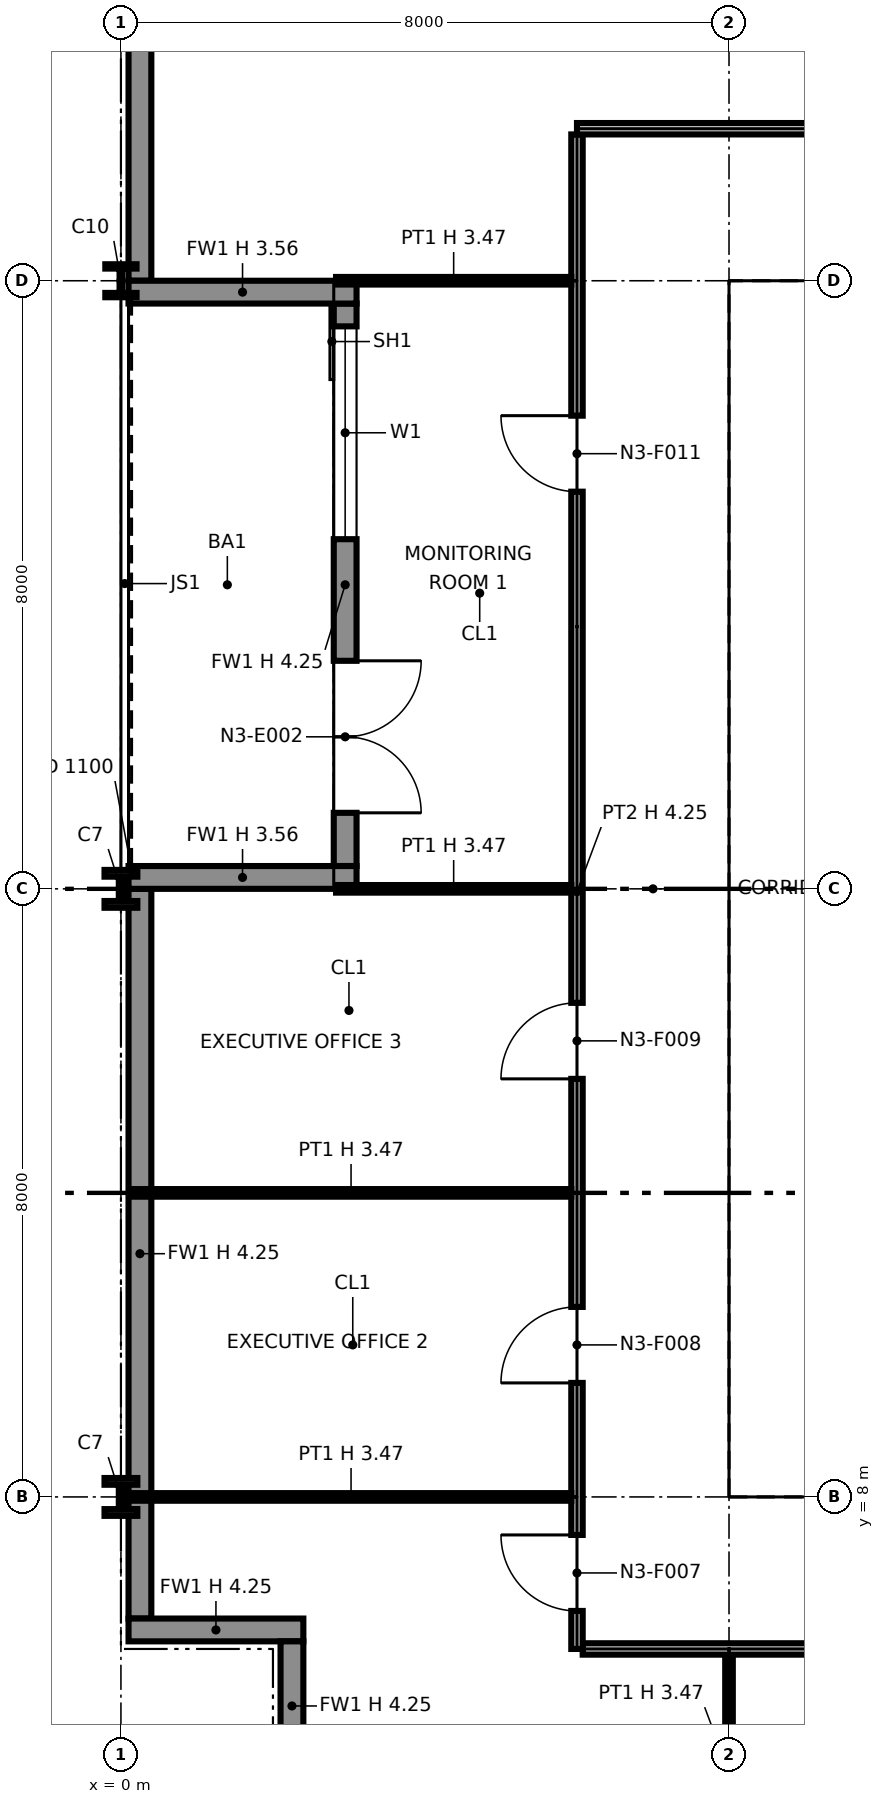
"""IFC4 building model, lengths in metres.
Left out: names, types, materials, properties, quantities, classifications, styles, units other than length and angle.
Written with IfcOpenShell. Run it as: python <this file> out.ifc"""

import sys

from ifc_helpers import new_model, si_unit, direction, frame, frame_2d, origin, origin_2d, place, context, subcontext, project, spatial, polyline, rectangle, i_section, outline, extrude, element, fill, save


model = new_model("IFC4")
c1 = context("Model", 3, precision=1e-05, world=origin(), true_north=direction((0.0, 1.0)))
c2 = subcontext(c1, "Body", "Model", "MODEL_VIEW")
j1 = project(units=[si_unit("LENGTHUNIT", "METRE"), si_unit("PLANEANGLEUNIT", "RADIAN")], contexts=[c1])
p1 = place(None, origin())
s1 = spatial("IfcSite", under=j1, at=p1, CompositionType="ELEMENT")
p2 = place(p1, origin())
s2 = spatial("IfcBuilding", under=s1, at=p2, CompositionType="ELEMENT")
p3 = place(p2, frame((0.0, 0.0, 65.6)))
s3 = spatial("IfcBuildingStorey", under=s2, at=p3, CompositionType="ELEMENT", Elevation=65.6)
for number, where, z_axis, x_axis in (
    (1, (0.0, 8.0, 0.0), (0.0, 0.0, 1.0), (1.0, 0.0, 0.0)),
    (2, (0.0, 16.0, 0.0), (0.0, 0.0, 1.0), (1.0, 0.0, 0.0)),
):
    element("IfcColumn", number, at=place(p3, frame(where, z_axis=z_axis, x_axis=x_axis)), inside=s3, PredefinedType="COLUMN", context=c2, shape_type="SweptSolid", body=[
        extrude(i_section(OverallWidth=0.432, OverallDepth=0.498, WebThickness=0.056, FlangeThickness=0.089, at=origin_2d()), origin(), (0.0, 0.0, 1.0), 4.25),
    ])
p4 = place(p3, frame((0.0, 24.0, 0.0), z_axis=(0.0, 0.0, 1.0), x_axis=(1.0, 0.0, 0.0)))
e3 = element("IfcColumn", 3, at=p4, inside=s3, PredefinedType="COLUMN", context=c2, shape_type="SweptSolid", body=[
    extrude(i_section(OverallWidth=0.411, OverallDepth=0.434, WebThickness=0.036, FlangeThickness=0.057, at=origin_2d()), origin(), (0.0, 0.0, 1.0), 4.25),
])
for number, where, z_axis, x_axis in (
    (4, (8.0, 8.0, 0.0), (0.0, 0.0, 1.0), (1.0, 0.0, 0.0)),
    (5, (8.0, 16.0, 0.0), (0.0, 0.0, 1.0), (1.0, 0.0, 0.0)),
):
    element("IfcColumn", number, at=place(p3, frame(where, z_axis=z_axis, x_axis=x_axis)), inside=s3, PredefinedType="COLUMN", context=c2, shape_type="SweptSolid", body=[
        extrude(i_section(OverallWidth=0.406, OverallDepth=0.417, WebThickness=0.03, FlangeThickness=0.048, at=origin_2d()), origin(), (0.0, 0.0, 1.0), 4.25),
    ])
p5 = place(p3, frame((8.0, 24.0, 0.0), z_axis=(0.0, 0.0, 1.0), x_axis=(1.0, 0.0, 0.0)))
e6 = element("IfcColumn", 6, at=p5, inside=s3, PredefinedType="COLUMN", context=c2, shape_type="SweptSolid", body=[
    extrude(i_section(OverallWidth=0.411, OverallDepth=0.434, WebThickness=0.036, FlangeThickness=0.057, at=origin_2d()), origin(), (0.0, 0.0, 1.0), 4.25),
])
p6 = place(p3, frame((0.25, 32.0, 0.0), z_axis=(0.0, 0.0, 1.0), x_axis=(0.0, -1.0, 0.0)))
e7 = element("IfcWall", 7, at=p6, inside=s3, PredefinedType="SOLIDWALL", context=c2, shape_type="SweptSolid", body=[
    extrude(rectangle(XDim=8.0, YDim=0.3, at=frame_2d((4.0, 0.0))), origin(), (0.0, 0.0, 1.0), 4.25),
])
p7 = place(p3, frame((2.95, 23.7, 0.0), z_axis=(0.0, 0.0, 1.0), x_axis=(0.0, -1.0, 0.0)))
e8 = element("IfcWall", 8, at=p7, inside=s3, PredefinedType="SOLIDWALL", context=c2, shape_type="SweptSolid", body=[
    extrude(rectangle(XDim=7.4, YDim=0.3, at=frame_2d((3.7, 0.0))), origin(), (0.0, 0.0, 1.0), 4.25),
])
p8 = place(p7, frame((0.3, 0.0, 0.9)))
e9 = element("IfcOpeningElement", 9, at=p8, cuts=e8, PredefinedType="OPENING", context=c2, shape_type="SweptSolid", body=[
    extrude(rectangle(XDim=2.8, YDim=2.2, at=frame_2d((1.4, 1.1))), frame((0.0, 0.16, 0.0), z_axis=(0.0, -1.0, 0.0), x_axis=(1.0, 0.0, 0.0)), (0.0, 0.0, 1.0), 0.32),
])
p9 = place(p7, frame((4.7, 0.0, 0.0)))
e10 = element("IfcOpeningElement", 10, at=p9, cuts=e8, PredefinedType="OPENING", context=c2, shape_type="SweptSolid", body=[
    extrude(rectangle(XDim=2.0, YDim=2.4, at=frame_2d((1.0, 1.2))), frame((0.0, 0.16, 0.0), z_axis=(0.0, -1.0, 0.0), x_axis=(1.0, 0.0, 0.0)), (0.0, 0.0, 1.0), 0.32),
])
for number, where, z_axis, x_axis in (
    (11, (0.1, 23.85, 0.0), (0.0, 0.0, 1.0), (1.0, 0.0, 0.0)),
    (12, (0.1, 16.15, 0.0), (0.0, 0.0, 1.0), (1.0, 0.0, 0.0)),
):
    element("IfcWall", number, at=place(p3, frame(where, z_axis=z_axis, x_axis=x_axis)), inside=s3, PredefinedType="SOLIDWALL", context=c2, shape_type="SweptSolid", body=[
        extrude(rectangle(XDim=3.0, YDim=0.3, at=frame_2d((1.5, 0.0))), origin(), (0.0, 0.0, 1.0), 3.556),
    ])
p10 = place(p3, frame((0.25, 16.0, 0.0), z_axis=(0.0, 0.0, 1.0), x_axis=(0.0, -1.0, 0.0)))
e13 = element("IfcWall", 13, at=p10, inside=s3, PredefinedType="SOLIDWALL", context=c2, shape_type="SweptSolid", body=[
    extrude(rectangle(XDim=9.6, YDim=0.3, at=frame_2d((4.8, 0.0))), origin(), (0.0, 0.0, 1.0), 4.25),
])
p11 = place(p3, frame((0.1, 6.25, 0.0), z_axis=(0.0, 0.0, 1.0), x_axis=(1.0, 0.0, 0.0)))
e14 = element("IfcWall", 14, at=p11, inside=s3, PredefinedType="SOLIDWALL", context=c2, shape_type="SweptSolid", body=[
    extrude(rectangle(XDim=2.3, YDim=0.3, at=frame_2d((1.15, 0.0))), origin(), (0.0, 0.0, 1.0), 4.25),
])
p12 = place(p3, frame((2.25, 6.1, 0.0), z_axis=(0.0, 0.0, 1.0), x_axis=(0.0, -1.0, 0.0)))
e15 = element("IfcWall", 15, at=p12, inside=s3, PredefinedType="SOLIDWALL", context=c2, shape_type="SweptSolid", body=[
    extrude(rectangle(XDim=1.7, YDim=0.3, at=frame_2d((0.85, 0.0))), origin(), (0.0, 0.0, 1.0), 4.25),
])
p13 = place(p3, frame((8.65, 8.75, 0.0), z_axis=(0.0, 0.0, 1.0), x_axis=(1.0, 0.0, 0.0)))
e16 = element("IfcWall", 16, at=p13, inside=s3, PredefinedType="PARTITIONING", context=c2, shape_type="SweptSolid", body=[
    extrude(outline(polyline([(0.0, 0.0), (14.7, 0.0), (14.7, 4.25), (7.469, 4.25), (7.469, 3.632), (7.231, 3.632), (7.23, 4.25), (0.0, 4.25), (0.0, 0.0)])), frame((0.0, 0.1, 0.0), z_axis=(0.0, -1.0, 0.0), x_axis=(1.0, 0.0, 0.0)), (0.0, 0.0, 1.0), 0.2),
])
p14 = place(p13, frame((1.3, 0.0, 0.0)))
e17 = element("IfcOpeningElement", 17, at=p14, cuts=e16, PredefinedType="OPENING", context=c2, shape_type="SweptSolid", body=[
    extrude(rectangle(XDim=1.4, YDim=2.1, at=frame_2d((0.7, 1.05))), frame((0.0, 0.11, 0.0), z_axis=(0.0, -1.0, 0.0), x_axis=(1.0, 0.0, 0.0)), (0.0, 0.0, 1.0), 0.22),
])
p15 = place(p13, frame((4.6, 0.0, 0.0)))
e18 = element("IfcOpeningElement", 18, at=p15, cuts=e16, PredefinedType="OPENING", context=c2, shape_type="SweptSolid", body=[
    extrude(rectangle(XDim=1.4, YDim=2.1, at=frame_2d((0.7, 1.05))), frame((0.0, 0.11, 0.0), z_axis=(0.0, -1.0, 0.0), x_axis=(1.0, 0.0, 0.0)), (0.0, 0.0, 1.0), 0.22),
])
p16 = place(p13, frame((10.4, 0.0, 0.0)))
e19 = element("IfcOpeningElement", 19, at=p16, cuts=e16, PredefinedType="OPENING", context=c2, shape_type="SweptSolid", body=[
    extrude(rectangle(XDim=1.2, YDim=2.1, at=frame_2d((0.6, 1.05))), frame((0.0, 0.11, 0.0), z_axis=(0.0, -1.0, 0.0), x_axis=(1.0, 0.0, 0.0)), (0.0, 0.0, 1.0), 0.22),
])
p17 = place(p3, frame((8.75, 8.85, 0.0), z_axis=(0.0, 0.0, 1.0), x_axis=(0.0, 1.0, 0.0)))
e20 = element("IfcWall", 20, at=p17, inside=s3, PredefinedType="PARTITIONING", context=c2, shape_type="SweptSolid", body=[
    extrude(outline(polyline([(0.0, 0.0), (14.3, 0.0), (14.3, 4.25), (10.231, 4.25), (10.23, 3.789), (10.07, 3.789), (10.069, 4.25), (7.27, 4.25), (7.269, 3.632), (7.031, 3.632), (7.031, 4.25), (0.0, 4.25), (0.0, 0.0)])), frame((0.0, 0.1, 0.0), z_axis=(0.0, -1.0, 0.0), x_axis=(1.0, 0.0, 0.0)), (0.0, 0.0, 1.0), 0.2),
])
p18 = place(p17, frame((8.3, 0.0, 0.0)))
e21 = element("IfcOpeningElement", 21, at=p18, cuts=e20, PredefinedType="OPENING", context=c2, shape_type="SweptSolid", body=[
    extrude(rectangle(XDim=1.8, YDim=2.1, at=frame_2d((0.9, 1.05))), frame((0.0, 0.11, 0.0), z_axis=(0.0, -1.0, 0.0), x_axis=(1.0, 0.0, 0.0)), (0.0, 0.0, 1.0), 0.22),
])
p19 = place(p3, frame((8.65, 23.25, 0.0), z_axis=(0.0, 0.0, 1.0), x_axis=(1.0, 0.0, 0.0)))
e22 = element("IfcWall", 22, at=p19, inside=s3, PredefinedType="PARTITIONING", context=c2, shape_type="SweptSolid", body=[
    extrude(outline(polyline([(0.0, 0.0), (14.7, 0.0), (14.7, 4.25), (7.469, 4.25), (7.469, 3.632), (7.231, 3.632), (7.23, 4.25), (0.0, 4.25), (0.0, 0.0)])), frame((0.0, 0.1, 0.0), z_axis=(0.0, -1.0, 0.0), x_axis=(1.0, 0.0, 0.0)), (0.0, 0.0, 1.0), 0.2),
])
p20 = place(p3, frame((8.85, 16.0, 0.0), z_axis=(0.0, 0.0, 1.0), x_axis=(1.0, 0.0, 0.0)))
e23 = element("IfcWall", 23, at=p20, inside=s3, PredefinedType="PARTITIONING", context=c2, shape_type="SweptSolid", body=[
    extrude(rectangle(XDim=6.931, YDim=0.6, at=frame_2d((3.466, 0.0))), origin(), (0.0, 0.0, 1.0), 3.632),
])
p21 = place(p3, frame((8.85, 19.9, 0.0), z_axis=(0.0, 0.0, 1.0), x_axis=(1.0, 0.0, 0.0)))
e24 = element("IfcWall", 24, at=p21, inside=s3, PredefinedType="PARTITIONING", context=c2, shape_type="SweptSolid", body=[
    extrude(outline(polyline([(0.0, 0.0), (14.3, 0.0), (14.3, 3.789), (7.27, 3.789), (7.269, 3.632), (7.031, 3.632), (7.031, 4.25), (0.0, 4.25), (0.0, 0.0)])), frame((0.0, 0.1, 0.0), z_axis=(0.0, -1.0, 0.0), x_axis=(1.0, 0.0, 0.0)), (0.0, 0.0, 1.0), 0.2),
])
p22 = place(p21, frame((6.9, 0.0, 0.0)))
e25 = element("IfcOpeningElement", 25, at=p22, cuts=e24, PredefinedType="OPENING", context=c2, shape_type="SweptSolid", body=[
    extrude(rectangle(XDim=0.9, YDim=2.1, at=frame_2d((0.45, 1.05))), frame((0.0, 0.11, 0.0), z_axis=(0.0, -1.0, 0.0), x_axis=(1.0, 0.0, 0.0)), (0.0, 0.0, 1.0), 0.22),
])
p23 = place(p21, frame((9.95, 0.0, 0.0)))
e26 = element("IfcOpeningElement", 26, at=p23, cuts=e24, PredefinedType="OPENING", context=c2, shape_type="SweptSolid", body=[
    extrude(rectangle(XDim=0.9, YDim=2.1, at=frame_2d((0.45, 1.05))), frame((0.0, 0.11, 0.0), z_axis=(0.0, -1.0, 0.0), x_axis=(1.0, 0.0, 0.0)), (0.0, 0.0, 1.0), 0.22),
])
p24 = place(p21, frame((12.45, 0.0, 0.0)))
e27 = element("IfcOpeningElement", 27, at=p24, cuts=e24, PredefinedType="OPENING", context=c2, shape_type="SweptSolid", body=[
    extrude(rectangle(XDim=0.9, YDim=2.1, at=frame_2d((0.45, 1.05))), frame((0.0, 0.11, 0.0), z_axis=(0.0, -1.0, 0.0), x_axis=(1.0, 0.0, 0.0)), (0.0, 0.0, 1.0), 0.22),
])
p25 = place(p3, frame((8.0, 2.83, 0.0), z_axis=(0.0, 0.0, 1.0), x_axis=(0.0, 1.0, 0.0)))
e28 = element("IfcWall", 28, at=p25, inside=s3, PredefinedType="PARTITIONING", context=c2, shape_type="SweptSolid", body=[
    extrude(rectangle(XDim=3.095, YDim=0.1, at=frame_2d((1.547, 0.0))), origin(), (0.0, 0.0, 1.0), 3.47),
])
p26 = place(p3, frame((6.075, 6.0, 0.0), z_axis=(0.0, 0.0, 1.0), x_axis=(1.0, 0.0, 0.0)))
e29 = element("IfcWall", 29, at=p26, inside=s3, PredefinedType="PARTITIONING", context=c2, shape_type="SweptSolid", body=[
    extrude(rectangle(XDim=19.85, YDim=0.15, at=frame_2d((9.925, 0.0))), origin(), (0.0, 0.0, 1.0), 4.25),
])
p27 = place(p26, frame((12.425, 0.0, 0.0), z_axis=(0.0, 0.0, 1.0), x_axis=(-1.0, 0.0, 0.0)))
e30 = element("IfcOpeningElement", 30, at=p27, cuts=e29, PredefinedType="OPENING", context=c2, shape_type="SweptSolid", body=[
    extrude(rectangle(XDim=1.0, YDim=2.1, at=frame_2d((0.5, 1.05))), frame((0.0, 0.085, 0.0), z_axis=(0.0, -1.0, 0.0), x_axis=(1.0, 0.0, 0.0)), (0.0, 0.0, 1.0), 0.17),
])
p28 = place(p26, frame((16.425, 0.0, 0.0), z_axis=(0.0, 0.0, 1.0), x_axis=(-1.0, 0.0, 0.0)))
e31 = element("IfcOpeningElement", 31, at=p28, cuts=e29, PredefinedType="OPENING", context=c2, shape_type="SweptSolid", body=[
    extrude(rectangle(XDim=1.0, YDim=2.1, at=frame_2d((0.5, 1.05))), frame((0.0, 0.085, 0.0), z_axis=(0.0, -1.0, 0.0), x_axis=(1.0, 0.0, 0.0)), (0.0, 0.0, 1.0), 0.17),
])
p29 = place(p26, frame((4.425, 0.0, 0.0), z_axis=(0.0, 0.0, 1.0), x_axis=(-1.0, 0.0, 0.0)))
e32 = element("IfcOpeningElement", 32, at=p29, cuts=e29, PredefinedType="OPENING", context=c2, shape_type="SweptSolid", body=[
    extrude(rectangle(XDim=1.0, YDim=2.1, at=frame_2d((0.5, 1.05))), frame((0.0, 0.085, 0.0), z_axis=(0.0, -1.0, 0.0), x_axis=(1.0, 0.0, 0.0)), (0.0, 0.0, 1.0), 0.17),
])
p30 = place(p26, frame((8.425, 0.0, 0.0), z_axis=(0.0, 0.0, 1.0), x_axis=(-1.0, 0.0, 0.0)))
e33 = element("IfcOpeningElement", 33, at=p30, cuts=e29, PredefinedType="OPENING", context=c2, shape_type="SweptSolid", body=[
    extrude(rectangle(XDim=1.0, YDim=2.1, at=frame_2d((0.5, 1.05))), frame((0.0, 0.085, 0.0), z_axis=(0.0, -1.0, 0.0), x_axis=(1.0, 0.0, 0.0)), (0.0, 0.0, 1.0), 0.17),
])
p31 = place(p26, frame((19.425, 0.0, 0.0), z_axis=(0.0, 0.0, 1.0), x_axis=(-1.0, 0.0, 0.0)))
e34 = element("IfcOpeningElement", 34, at=p31, cuts=e29, PredefinedType="OPENING", context=c2, shape_type="SweptSolid", body=[
    extrude(rectangle(XDim=1.0, YDim=2.1, at=frame_2d((0.5, 1.05))), frame((0.0, 0.085, 0.0), z_axis=(0.0, -1.0, 0.0), x_axis=(1.0, 0.0, 0.0)), (0.0, 0.0, 1.0), 0.17),
])
p32 = place(p3, frame((6.0, 6.0, 0.0), z_axis=(0.0, 0.0, 1.0), x_axis=(0.0, 1.0, 0.0)))
e35 = element("IfcWall", 35, at=p32, inside=s3, PredefinedType="PARTITIONING", context=c2, shape_type="SweptSolid", body=[
    extrude(outline(polyline([(0.0, 0.0), (19.925, 0.0), (19.925, 4.25), (18.3, 4.25), (18.298, 3.47), (17.702, 3.47), (17.7, 4.25), (14.3, 4.25), (14.298, 3.47), (13.702, 3.47), (13.7, 4.25), (10.3, 4.25), (10.298, 3.47), (9.702, 3.47), (9.7, 4.25), (6.3, 4.25), (6.298, 3.47), (5.702, 3.47), (5.7, 4.25), (2.3, 4.25), (2.298, 3.47), (1.702, 3.47), (1.7, 4.25), (0.0, 4.25), (0.0, 0.0)])), frame((0.0, 0.075, 0.0), z_axis=(0.0, -1.0, 0.0), x_axis=(1.0, 0.0, 0.0)), (0.0, 0.0, 1.0), 0.15),
])
p33 = place(p32, frame((0.5, 0.0, 0.0)))
e36 = element("IfcOpeningElement", 36, at=p33, cuts=e35, PredefinedType="OPENING", context=c2, shape_type="SweptSolid", body=[
    extrude(rectangle(XDim=1.0, YDim=2.1, at=frame_2d((0.5, 1.05))), frame((0.0, 0.085, 0.0), z_axis=(0.0, -1.0, 0.0), x_axis=(1.0, 0.0, 0.0)), (0.0, 0.0, 1.0), 0.17),
])
p34 = place(p32, frame((3.5, 0.0, 0.0)))
e37 = element("IfcOpeningElement", 37, at=p34, cuts=e35, PredefinedType="OPENING", context=c2, shape_type="SweptSolid", body=[
    extrude(rectangle(XDim=1.0, YDim=2.1, at=frame_2d((0.5, 1.05))), frame((0.0, 0.085, 0.0), z_axis=(0.0, -1.0, 0.0), x_axis=(1.0, 0.0, 0.0)), (0.0, 0.0, 1.0), 0.17),
])
p35 = place(p32, frame((7.5, 0.0, 0.0)))
e38 = element("IfcOpeningElement", 38, at=p35, cuts=e35, PredefinedType="OPENING", context=c2, shape_type="SweptSolid", body=[
    extrude(rectangle(XDim=1.0, YDim=2.1, at=frame_2d((0.5, 1.05))), frame((0.0, 0.085, 0.0), z_axis=(0.0, -1.0, 0.0), x_axis=(1.0, 0.0, 0.0)), (0.0, 0.0, 1.0), 0.17),
])
p36 = place(p32, frame((15.225, 0.0, 0.0)))
e39 = element("IfcOpeningElement", 39, at=p36, cuts=e35, PredefinedType="OPENING", context=c2, shape_type="SweptSolid", body=[
    extrude(rectangle(XDim=1.0, YDim=2.1, at=frame_2d((0.5, 1.05))), frame((0.0, 0.085, 0.0), z_axis=(0.0, -1.0, 0.0), x_axis=(1.0, 0.0, 0.0)), (0.0, 0.0, 1.0), 0.17),
])
for number, where, z_axis, x_axis in (
    (40, (0.13, 8.0, 0.0), (0.0, 0.0, 1.0), (1.0, 0.0, 0.0)),
    (41, (0.13, 12.0, 0.0), (0.0, 0.0, 1.0), (1.0, 0.0, 0.0)),
):
    element("IfcWall", number, at=place(p3, frame(where, z_axis=z_axis, x_axis=x_axis)), inside=s3, PredefinedType="PARTITIONING", context=c2, shape_type="SweptSolid", body=[
        extrude(rectangle(XDim=5.795, YDim=0.1, at=frame_2d((2.897, 0.0))), origin(), (0.0, 0.0, 1.0), 3.47),
    ])
for number, where, z_axis, x_axis in (
    (42, (2.83, 16.0, 0.0), (0.0, 0.0, 1.0), (1.0, 0.0, 0.0)),
    (43, (2.83, 24.0, 0.0), (0.0, 0.0, 1.0), (1.0, 0.0, 0.0)),
):
    element("IfcWall", number, at=place(p3, frame(where, z_axis=z_axis, x_axis=x_axis)), inside=s3, PredefinedType="PARTITIONING", context=c2, shape_type="SweptSolid", body=[
        extrude(rectangle(XDim=3.095, YDim=0.1, at=frame_2d((1.547, 0.0))), origin(), (0.0, 0.0, 1.0), 3.47),
    ])
p37 = place(p3, frame((6.0, 26.0, 0.0), z_axis=(0.0, 0.0, 1.0), x_axis=(1.0, 0.0, 0.0)))
e44 = element("IfcWall", 44, at=p37, inside=s3, PredefinedType="PARTITIONING", context=c2, shape_type="SweptSolid", body=[
    extrude(rectangle(XDim=17.925, YDim=0.15, at=frame_2d((8.962, 0.0))), origin(), (0.0, 0.0, 1.0), 4.25),
])
p38 = place(p37, frame((5.1, 0.0, 0.0)))
e45 = element("IfcOpeningElement", 45, at=p38, cuts=e44, PredefinedType="OPENING", context=c2, shape_type="SweptSolid", body=[
    extrude(rectangle(XDim=1.8, YDim=2.1, at=frame_2d((0.9, 1.05))), frame((0.0, 0.085, 0.0), z_axis=(0.0, -1.0, 0.0), x_axis=(1.0, 0.0, 0.0)), (0.0, 0.0, 1.0), 0.17),
])
p39 = place(p8, origin())
e46 = element("IfcWindow", 46, at=p39, inside=s3, PartitioningType="SINGLE_PANEL", PredefinedType="WINDOW", context=c2, shape_type="SweptSolid", body=[
    extrude(rectangle(XDim=2.8, YDim=2.2, at=frame_2d((1.4, 1.1))), frame((0.0, 0.03, 0.0), z_axis=(0.0, -1.0, 0.0), x_axis=(1.0, 0.0, 0.0)), (0.0, 0.0, 1.0), 0.06),
])
fill(e9, e46)
p40 = place(p9, origin())
e47 = element("IfcDoor", 47, at=p40, inside=s3, OperationType="DOUBLE_DOOR_SINGLE_SWING", PredefinedType="DOOR", context=c2, shape_type="SweptSolid", body=[
    extrude(rectangle(XDim=2.0, YDim=2.4, at=frame_2d((1.0, 1.2))), frame((0.0, 0.025, 0.0), z_axis=(0.0, -1.0, 0.0), x_axis=(1.0, 0.0, 0.0)), (0.0, 0.0, 1.0), 0.05),
])
fill(e10, e47)
p41 = place(p18, origin())
e48 = element("IfcDoor", 48, at=p41, inside=s3, OperationType="DOUBLE_DOOR_SINGLE_SWING", PredefinedType="NOTDEFINED", context=c2, shape_type="SweptSolid", body=[
    extrude(rectangle(XDim=1.8, YDim=2.1, at=frame_2d((0.9, 1.05))), frame((0.0, 0.025, 0.0), z_axis=(0.0, -1.0, 0.0), x_axis=(1.0, 0.0, 0.0)), (0.0, 0.0, 1.0), 0.05),
])
fill(e21, e48)
p42 = place(p33, origin())
e49 = element("IfcDoor", 49, at=p42, inside=s3, OperationType="SINGLE_SWING_RIGHT", PredefinedType="DOOR", context=c2, shape_type="SweptSolid", body=[
    extrude(rectangle(XDim=1.0, YDim=2.1, at=frame_2d((0.5, 1.05))), frame((0.0, 0.025, 0.0), z_axis=(0.0, -1.0, 0.0), x_axis=(1.0, 0.0, 0.0)), (0.0, 0.0, 1.0), 0.05),
])
fill(e36, e49)
p43 = place(p34, origin())
e50 = element("IfcDoor", 50, at=p43, inside=s3, OperationType="SINGLE_SWING_LEFT", PredefinedType="DOOR", context=c2, shape_type="SweptSolid", body=[
    extrude(rectangle(XDim=1.0, YDim=2.1, at=frame_2d((0.5, 1.05))), frame((0.0, 0.025, 0.0), z_axis=(0.0, -1.0, 0.0), x_axis=(1.0, 0.0, 0.0)), (0.0, 0.0, 1.0), 0.05),
])
fill(e37, e50)
p44 = place(p35, origin())
e51 = element("IfcDoor", 51, at=p44, inside=s3, OperationType="SINGLE_SWING_LEFT", PredefinedType="DOOR", context=c2, shape_type="SweptSolid", body=[
    extrude(rectangle(XDim=1.0, YDim=2.1, at=frame_2d((0.5, 1.05))), frame((0.0, 0.025, 0.0), z_axis=(0.0, -1.0, 0.0), x_axis=(1.0, 0.0, 0.0)), (0.0, 0.0, 1.0), 0.05),
])
fill(e38, e51)
p45 = place(p36, origin())
e52 = element("IfcDoor", 52, at=p45, inside=s3, OperationType="SINGLE_SWING_RIGHT", PredefinedType="DOOR", context=c2, shape_type="SweptSolid", body=[
    extrude(rectangle(XDim=1.0, YDim=2.1, at=frame_2d((0.5, 1.05))), frame((0.0, 0.025, 0.0), z_axis=(0.0, -1.0, 0.0), x_axis=(1.0, 0.0, 0.0)), (0.0, 0.0, 1.0), 0.05),
])
fill(e39, e52)
save(model, sys.argv[1])
